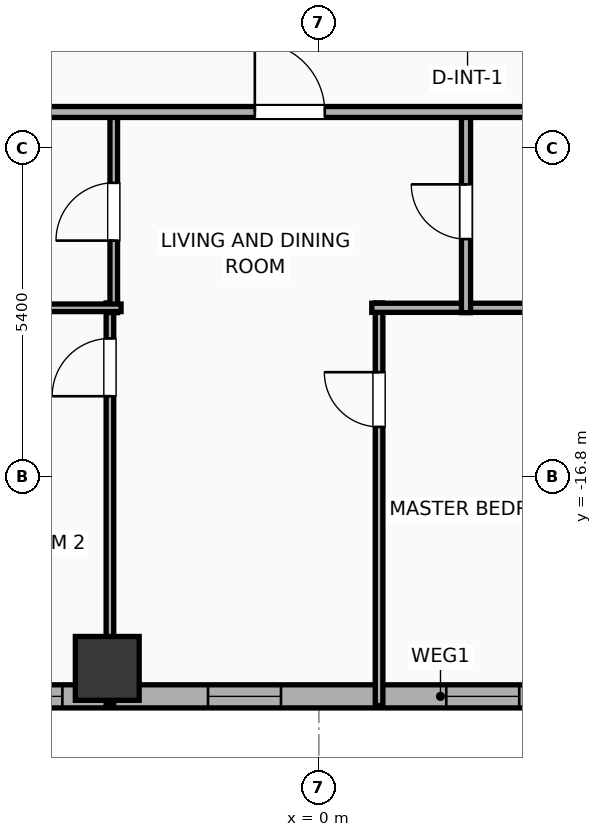
"""IFC4 building model, lengths in metres.
Left out: names, types, materials, properties, quantities, classifications, styles, units other than length and angle.
Written with IfcOpenShell. Run it as: python <this file> out.ifc"""

import sys

from ifc_helpers import new_model, si_unit, direction, frame, frame_2d, origin, origin_2d, place, context, subcontext, project, spatial, rectangle, hollow_rectangle, extrude, element, fill, save


model = new_model("IFC4")
c1 = context("Model", 3, precision=1e-05, world=origin(), true_north=direction((0.0, 1.0)))
c2 = subcontext(c1, "Body", "Model", "MODEL_VIEW")
j1 = project(units=[si_unit("LENGTHUNIT", "METRE"), si_unit("PLANEANGLEUNIT", "RADIAN")], contexts=[c1])
p1 = place(None, origin())
s1 = spatial("IfcSite", under=j1, at=p1, CompositionType="ELEMENT")
p2 = place(p1, origin())
s2 = spatial("IfcBuilding", under=s1, at=p2, CompositionType="ELEMENT")
p3 = place(p2, frame((0.0, 0.0, 109.2)))
s3 = spatial("IfcBuildingStorey", under=s2, at=p3, CompositionType="ELEMENT", Elevation=109.2)
p4 = place(p3, frame((-3.48, -19.95, 0.0), z_axis=(0.0, 0.0, 1.0), x_axis=(1.0, 0.0, 0.0)))
e1 = element("IfcColumn", 1, at=p4, inside=s3, PredefinedType="COLUMN", context=c2, shape_type="SweptSolid", body=[
    extrude(hollow_rectangle(XDim=1.05, YDim=1.05, WallThickness=0.036, at=origin_2d()), origin(), (0.0, 0.0, 1.0), 3.9),
])
p5 = place(p3, frame((29.381, -20.41, 0.0), z_axis=(0.0, 0.0, 1.0), x_axis=(-1.0, 0.0, 0.0)))
e2 = element("IfcWall", 2, at=p5, inside=s3, PredefinedType="ELEMENTEDWALL", context=c2, shape_type="SweptSolid", body=[
    extrude(rectangle(XDim=54.763, YDim=0.38, at=frame_2d((27.381, 0.0))), origin(), (0.0, 0.0, 1.0), 3.65),
])
p6 = place(p5, frame((3.995, 0.0, 0.75)))
e3 = element("IfcOpeningElement", 3, at=p6, cuts=e2, PredefinedType="OPENING", context=c2, shape_type="SweptSolid", body=[
    extrude(rectangle(XDim=2.4, YDim=2.1, at=frame_2d((1.2, 1.05))), frame((0.0, 0.2, 0.0), z_axis=(0.0, -1.0, 0.0), x_axis=(1.0, 0.0, 0.0)), (0.0, 0.0, 1.0), 0.4),
])
p7 = place(p5, frame((18.486, 0.0, 0.75)))
e4 = element("IfcOpeningElement", 4, at=p7, cuts=e2, PredefinedType="OPENING", context=c2, shape_type="SweptSolid", body=[
    extrude(rectangle(XDim=2.4, YDim=2.1, at=frame_2d((1.2, 1.05))), frame((0.0, 0.2, 0.0), z_axis=(0.0, -1.0, 0.0), x_axis=(1.0, 0.0, 0.0)), (0.0, 0.0, 1.0), 0.4),
])
p8 = place(p5, frame((46.717, 0.0, 0.75)))
e5 = element("IfcOpeningElement", 5, at=p8, cuts=e2, PredefinedType="OPENING", context=c2, shape_type="SweptSolid", body=[
    extrude(rectangle(XDim=2.4, YDim=2.1, at=frame_2d((1.2, 1.05))), frame((0.0, 0.2, 0.0), z_axis=(0.0, -1.0, 0.0), x_axis=(1.0, 0.0, 0.0)), (0.0, 0.0, 1.0), 0.4),
])
p9 = place(p5, frame((52.651, 0.0, 0.75)))
e6 = element("IfcOpeningElement", 6, at=p9, cuts=e2, PredefinedType="OPENING", context=c2, shape_type="SweptSolid", body=[
    extrude(rectangle(XDim=1.2, YDim=2.05, at=frame_2d((0.6, 1.025))), frame((0.0, 0.2, 0.0), z_axis=(0.0, -1.0, 0.0), x_axis=(1.0, 0.0, 0.0)), (0.0, 0.0, 1.0), 0.4),
])
p10 = place(p5, frame((50.521, 0.0, 0.75)))
e7 = element("IfcOpeningElement", 7, at=p10, cuts=e2, PredefinedType="OPENING", context=c2, shape_type="SweptSolid", body=[
    extrude(rectangle(XDim=1.2, YDim=2.05, at=frame_2d((0.6, 1.025))), frame((0.0, 0.2, 0.0), z_axis=(0.0, -1.0, 0.0), x_axis=(1.0, 0.0, 0.0)), (0.0, 0.0, 1.0), 0.4),
])
p11 = place(p5, frame((40.191, 0.0, 0.75)))
e8 = element("IfcOpeningElement", 8, at=p11, cuts=e2, PredefinedType="OPENING", context=c2, shape_type="SweptSolid", body=[
    extrude(rectangle(XDim=1.2, YDim=2.05, at=frame_2d((0.6, 1.025))), frame((0.0, 0.2, 0.0), z_axis=(0.0, -1.0, 0.0), x_axis=(1.0, 0.0, 0.0)), (0.0, 0.0, 1.0), 0.4),
])
p12 = place(p5, frame((44.631, 0.0, 0.75)))
e9 = element("IfcOpeningElement", 9, at=p12, cuts=e2, PredefinedType="OPENING", context=c2, shape_type="SweptSolid", body=[
    extrude(rectangle(XDim=1.2, YDim=2.05, at=frame_2d((0.6, 1.025))), frame((0.0, 0.2, 0.0), z_axis=(0.0, -1.0, 0.0), x_axis=(1.0, 0.0, 0.0)), (0.0, 0.0, 1.0), 0.4),
])
p13 = place(p5, frame((36.561, 0.0, 0.75)))
e10 = element("IfcOpeningElement", 10, at=p13, cuts=e2, PredefinedType="OPENING", context=c2, shape_type="SweptSolid", body=[
    extrude(rectangle(XDim=1.2, YDim=2.05, at=frame_2d((0.6, 1.025))), frame((0.0, 0.2, 0.0), z_axis=(0.0, -1.0, 0.0), x_axis=(1.0, 0.0, 0.0)), (0.0, 0.0, 1.0), 0.4),
])
p14 = place(p5, frame((30.004, 0.0, 0.75)))
e11 = element("IfcOpeningElement", 11, at=p14, cuts=e2, PredefinedType="OPENING", context=c2, shape_type="SweptSolid", body=[
    extrude(rectangle(XDim=1.2, YDim=2.05, at=frame_2d((0.6, 1.025))), frame((0.0, 0.2, 0.0), z_axis=(0.0, -1.0, 0.0), x_axis=(1.0, 0.0, 0.0)), (0.0, 0.0, 1.0), 0.4),
])
p15 = place(p5, frame((33.599, 0.0, 0.75)))
e12 = element("IfcOpeningElement", 12, at=p15, cuts=e2, PredefinedType="OPENING", context=c2, shape_type="SweptSolid", body=[
    extrude(rectangle(XDim=1.2, YDim=2.05, at=frame_2d((0.6, 1.025))), frame((0.0, 0.2, 0.0), z_axis=(0.0, -1.0, 0.0), x_axis=(1.0, 0.0, 0.0)), (0.0, 0.0, 1.0), 0.4),
])
p16 = place(p5, frame((26.086, 0.0, 0.75)))
e13 = element("IfcOpeningElement", 13, at=p16, cuts=e2, PredefinedType="OPENING", context=c2, shape_type="SweptSolid", body=[
    extrude(rectangle(XDim=1.2, YDim=2.05, at=frame_2d((0.6, 1.025))), frame((0.0, 0.2, 0.0), z_axis=(0.0, -1.0, 0.0), x_axis=(1.0, 0.0, 0.0)), (0.0, 0.0, 1.0), 0.4),
])
p17 = place(p5, frame((22.626, 0.0, 0.75)))
e14 = element("IfcOpeningElement", 14, at=p17, cuts=e2, PredefinedType="OPENING", context=c2, shape_type="SweptSolid", body=[
    extrude(rectangle(XDim=1.2, YDim=2.05, at=frame_2d((0.6, 1.025))), frame((0.0, 0.2, 0.0), z_axis=(0.0, -1.0, 0.0), x_axis=(1.0, 0.0, 0.0)), (0.0, 0.0, 1.0), 0.4),
])
p18 = place(p5, frame((15.361, 0.0, 0.75)))
e15 = element("IfcOpeningElement", 15, at=p18, cuts=e2, PredefinedType="OPENING", context=c2, shape_type="SweptSolid", body=[
    extrude(rectangle(XDim=1.2, YDim=2.05, at=frame_2d((0.6, 1.025))), frame((0.0, 0.2, 0.0), z_axis=(0.0, -1.0, 0.0), x_axis=(1.0, 0.0, 0.0)), (0.0, 0.0, 1.0), 0.4),
])
p19 = place(p5, frame((8.986, 0.0, 0.75)))
e16 = element("IfcOpeningElement", 16, at=p19, cuts=e2, PredefinedType="OPENING", context=c2, shape_type="SweptSolid", body=[
    extrude(rectangle(XDim=1.2, YDim=2.05, at=frame_2d((0.6, 1.025))), frame((0.0, 0.2, 0.0), z_axis=(0.0, -1.0, 0.0), x_axis=(1.0, 0.0, 0.0)), (0.0, 0.0, 1.0), 0.4),
])
p20 = place(p5, frame((1.736, 0.0, 0.75)))
e17 = element("IfcOpeningElement", 17, at=p20, cuts=e2, PredefinedType="OPENING", context=c2, shape_type="SweptSolid", body=[
    extrude(rectangle(XDim=1.2, YDim=2.05, at=frame_2d((0.6, 1.025))), frame((0.0, 0.2, 0.0), z_axis=(0.0, -1.0, 0.0), x_axis=(1.0, 0.0, 0.0)), (0.0, 0.0, 1.0), 0.4),
])
p21 = place(p3, frame((-3.436, -20.56, 0.0), z_axis=(0.0, 0.0, 1.0), x_axis=(0.0, 1.0, 0.0)))
e18 = element("IfcWall", 18, at=p21, inside=s3, PredefinedType="PARTITIONING", context=c2, shape_type="SweptSolid", body=[
    extrude(rectangle(XDim=6.62, YDim=0.125, at=frame_2d((3.31, 0.0))), origin(), (0.0, 0.0, 1.0), 3.04),
])
p22 = place(p21, frame((5.086, 0.0, 0.0)))
e19 = element("IfcOpeningElement", 19, at=p22, cuts=e18, PredefinedType="OPENING", context=c2, shape_type="SweptSolid", body=[
    extrude(rectangle(XDim=0.95, YDim=2.05, at=frame_2d((0.475, 1.025))), frame((0.0, 0.073, 0.0), z_axis=(0.0, -1.0, 0.0), x_axis=(1.0, 0.0, 0.0)), (0.0, 0.0, 1.0), 0.145),
])
p23 = place(p3, frame((0.99, -20.56, 0.0), z_axis=(0.0, 0.0, 1.0), x_axis=(0.0, 1.0, 0.0)))
e20 = element("IfcWall", 20, at=p23, inside=s3, PredefinedType="PARTITIONING", context=c2, shape_type="SweptSolid", body=[
    extrude(rectangle(XDim=6.62, YDim=0.125, at=frame_2d((3.31, 0.0))), origin(), (0.0, 0.0, 1.0), 3.65),
])
p24 = place(p23, frame((4.581, 0.0, 0.0)))
e21 = element("IfcOpeningElement", 21, at=p24, cuts=e20, PredefinedType="OPENING", context=c2, shape_type="SweptSolid", body=[
    extrude(rectangle(XDim=0.9, YDim=2.05, at=frame_2d((0.45, 1.025))), frame((0.0, 0.073, 0.0), z_axis=(0.0, -1.0, 0.0), x_axis=(1.0, 0.0, 0.0)), (0.0, 0.0, 1.0), 0.145),
])
p25 = place(p3, frame((0.87, -14.02, 0.0), z_axis=(0.0, 0.0, 1.0), x_axis=(1.0, 0.0, 0.0)))
e22 = element("IfcWall", 22, at=p25, inside=s3, PredefinedType="PLUMBINGWALL", context=c2, shape_type="SweptSolid", body=[
    extrude(rectangle(XDim=3.79, YDim=0.15, at=frame_2d((1.895, 0.0))), origin(), (0.0, 0.0, 1.0), 3.65),
])
p26 = place(p3, frame((-3.373, -14.1, 0.0), z_axis=(0.0, 0.0, 1.0), x_axis=(0.0, 1.0, 0.0)))
e23 = element("IfcWall", 23, at=p26, inside=s3, PredefinedType="PARTITIONING", context=c2, shape_type="SweptSolid", body=[
    extrude(rectangle(XDim=3.32, YDim=0.125, at=frame_2d((1.66, 0.0))), origin(), (0.0, 0.0, 1.0), 3.65),
])
p27 = place(p26, frame((1.185, 0.0, 0.0)))
e24 = element("IfcOpeningElement", 24, at=p27, cuts=e23, PredefinedType="OPENING", context=c2, shape_type="SweptSolid", body=[
    extrude(rectangle(XDim=0.95, YDim=2.05, at=frame_2d((0.475, 1.025))), frame((0.0, 0.073, 0.0), z_axis=(0.0, -1.0, 0.0), x_axis=(1.0, 0.0, 0.0)), (0.0, 0.0, 1.0), 0.145),
])
p28 = place(p3, frame((-6.46, -14.02, 0.0), z_axis=(0.0, 0.0, 1.0), x_axis=(1.0, 0.0, 0.0)))
e25 = element("IfcWall", 25, at=p28, inside=s3, PredefinedType="PARTITIONING", context=c2, shape_type="SweptSolid", body=[
    extrude(rectangle(XDim=3.207, YDim=0.125, at=frame_2d((1.604, 0.0))), origin(), (0.0, 0.0, 1.0), 3.65),
])
p29 = place(p3, frame((2.42, -14.1, 0.0), z_axis=(0.0, 0.0, 1.0), x_axis=(0.0, 1.0, 0.0)))
e26 = element("IfcWall", 26, at=p29, inside=s3, PredefinedType="PLUMBINGWALL", context=c2, shape_type="SweptSolid", body=[
    extrude(rectangle(XDim=3.32, YDim=0.15, at=frame_2d((1.66, 0.0))), origin(), (0.0, 0.0, 1.0), 3.65),
])
p30 = place(p29, frame((1.21, 0.0, 0.0)))
e27 = element("IfcOpeningElement", 27, at=p30, cuts=e26, PredefinedType="OPENING", context=c2, shape_type="SweptSolid", body=[
    extrude(rectangle(XDim=0.9, YDim=2.05, at=frame_2d((0.45, 1.025))), frame((0.0, 0.085, 0.0), z_axis=(0.0, -1.0, 0.0), x_axis=(1.0, 0.0, 0.0)), (0.0, 0.0, 1.0), 0.17),
])
p31 = place(p3, frame((-29.21, -10.8, 0.0), z_axis=(0.0, 0.0, 1.0), x_axis=(1.0, 0.0, 0.0)))
e28 = element("IfcWall", 28, at=p31, inside=s3, PredefinedType="PARTITIONING", context=c2, shape_type="SweptSolid", body=[
    extrude(rectangle(XDim=62.42, YDim=0.18, at=frame_2d((31.21, 0.0))), origin(), (0.0, 0.0, 1.0), 3.65),
])
p32 = place(p31, frame((2.74, 0.0, 0.0)))
e29 = element("IfcOpeningElement", 29, at=p32, cuts=e28, PredefinedType="OPENING", context=c2, shape_type="SweptSolid", body=[
    extrude(rectangle(XDim=0.9, YDim=2.05, at=frame_2d((0.45, 1.025))), frame((0.0, 0.1, 0.0), z_axis=(0.0, -1.0, 0.0), x_axis=(1.0, 0.0, 0.0)), (0.0, 0.0, 1.0), 0.2),
])
p33 = place(p31, frame((9.968, 0.0, 0.0)))
e30 = element("IfcOpeningElement", 30, at=p33, cuts=e28, PredefinedType="OPENING", context=c2, shape_type="SweptSolid", body=[
    extrude(rectangle(XDim=1.15, YDim=2.05, at=frame_2d((0.575, 1.025))), frame((0.0, 0.1, 0.0), z_axis=(0.0, -1.0, 0.0), x_axis=(1.0, 0.0, 0.0)), (0.0, 0.0, 1.0), 0.2),
])
p34 = place(p31, frame((17.227, 0.0, 0.0)))
e31 = element("IfcOpeningElement", 31, at=p34, cuts=e28, PredefinedType="OPENING", context=c2, shape_type="SweptSolid", body=[
    extrude(rectangle(XDim=1.15, YDim=2.05, at=frame_2d((0.575, 1.025))), frame((0.0, 0.1, 0.0), z_axis=(0.0, -1.0, 0.0), x_axis=(1.0, 0.0, 0.0)), (0.0, 0.0, 1.0), 0.2),
])
p35 = place(p31, frame((28.157, 0.0, 0.0)))
e32 = element("IfcOpeningElement", 32, at=p35, cuts=e28, PredefinedType="OPENING", context=c2, shape_type="SweptSolid", body=[
    extrude(rectangle(XDim=1.15, YDim=2.05, at=frame_2d((0.575, 1.025))), frame((0.0, 0.1, 0.0), z_axis=(0.0, -1.0, 0.0), x_axis=(1.0, 0.0, 0.0)), (0.0, 0.0, 1.0), 0.2),
])
p36 = place(p31, frame((38.512, 0.0, 0.0)))
e33 = element("IfcOpeningElement", 33, at=p36, cuts=e28, PredefinedType="OPENING", context=c2, shape_type="SweptSolid", body=[
    extrude(rectangle(XDim=1.15, YDim=2.05, at=frame_2d((0.575, 1.025))), frame((0.0, 0.1, 0.0), z_axis=(0.0, -1.0, 0.0), x_axis=(1.0, 0.0, 0.0)), (0.0, 0.0, 1.0), 0.2),
])
p37 = place(p31, frame((49.33, 0.0, 0.0)))
e34 = element("IfcOpeningElement", 34, at=p37, cuts=e28, PredefinedType="OPENING", context=c2, shape_type="SweptSolid", body=[
    extrude(rectangle(XDim=1.15, YDim=2.05, at=frame_2d((0.575, 1.025))), frame((0.0, 0.1, 0.0), z_axis=(0.0, -1.0, 0.0), x_axis=(1.0, 0.0, 0.0)), (0.0, 0.0, 1.0), 0.2),
])
p38 = place(p31, frame((58.237, 0.0, 0.0)))
e35 = element("IfcOpeningElement", 35, at=p38, cuts=e28, PredefinedType="OPENING", context=c2, shape_type="SweptSolid", body=[
    extrude(rectangle(XDim=1.15, YDim=2.05, at=frame_2d((0.575, 1.025))), frame((0.0, 0.1, 0.0), z_axis=(0.0, -1.0, 0.0), x_axis=(1.0, 0.0, 0.0)), (0.0, 0.0, 1.0), 0.2),
])
p39 = place(p14, origin())
e36 = element("IfcWindow", 36, at=p39, inside=s3, PartitioningType="SINGLE_PANEL", PredefinedType="WINDOW", context=c2, shape_type="SweptSolid", body=[
    extrude(rectangle(XDim=1.2, YDim=2.05, at=frame_2d((0.6, 1.025))), frame((0.0, 0.03, 0.0), z_axis=(0.0, -1.0, 0.0), x_axis=(1.0, 0.0, 0.0)), (0.0, 0.0, 1.0), 0.06),
])
fill(e11, e36)
p40 = place(p15, origin())
e37 = element("IfcWindow", 37, at=p40, inside=s3, PartitioningType="SINGLE_PANEL", PredefinedType="WINDOW", context=c2, shape_type="SweptSolid", body=[
    extrude(rectangle(XDim=1.2, YDim=2.05, at=frame_2d((0.6, 1.025))), frame((0.0, 0.03, 0.0), z_axis=(0.0, -1.0, 0.0), x_axis=(1.0, 0.0, 0.0)), (0.0, 0.0, 1.0), 0.06),
])
fill(e12, e37)
p41 = place(p16, origin())
e38 = element("IfcWindow", 38, at=p41, inside=s3, PartitioningType="SINGLE_PANEL", PredefinedType="WINDOW", context=c2, shape_type="SweptSolid", body=[
    extrude(rectangle(XDim=1.2, YDim=2.05, at=frame_2d((0.6, 1.025))), frame((0.0, 0.03, 0.0), z_axis=(0.0, -1.0, 0.0), x_axis=(1.0, 0.0, 0.0)), (0.0, 0.0, 1.0), 0.06),
])
fill(e13, e38)
p42 = place(p22, origin())
e39 = element("IfcDoor", 39, at=p42, inside=s3, OperationType="SINGLE_SWING_LEFT", PredefinedType="DOOR", context=c2, shape_type="SweptSolid", body=[
    extrude(rectangle(XDim=0.95, YDim=2.05, at=frame_2d((0.475, 1.025))), frame((0.0, 0.025, 0.0), z_axis=(0.0, -1.0, 0.0), x_axis=(1.0, 0.0, 0.0)), (0.0, 0.0, 1.0), 0.05),
])
fill(e19, e39)
p43 = place(p24, origin())
e40 = element("IfcDoor", 40, at=p43, inside=s3, OperationType="SINGLE_SWING_RIGHT", PredefinedType="DOOR", context=c2, shape_type="SweptSolid", body=[
    extrude(rectangle(XDim=0.9, YDim=2.05, at=frame_2d((0.45, 1.025))), frame((0.0, 0.025, 0.0), z_axis=(0.0, -1.0, 0.0), x_axis=(1.0, 0.0, 0.0)), (0.0, 0.0, 1.0), 0.05),
])
fill(e21, e40)
p44 = place(p27, origin())
e41 = element("IfcDoor", 41, at=p44, inside=s3, OperationType="SINGLE_SWING_LEFT", PredefinedType="DOOR", context=c2, shape_type="SweptSolid", body=[
    extrude(rectangle(XDim=0.95, YDim=2.05, at=frame_2d((0.475, 1.025))), frame((0.0, 0.025, 0.0), z_axis=(0.0, -1.0, 0.0), x_axis=(1.0, 0.0, 0.0)), (0.0, 0.0, 1.0), 0.05),
])
fill(e24, e41)
p45 = place(p30, origin())
e42 = element("IfcDoor", 42, at=p45, inside=s3, OperationType="SINGLE_SWING_RIGHT", PredefinedType="DOOR", context=c2, shape_type="SweptSolid", body=[
    extrude(rectangle(XDim=0.9, YDim=2.05, at=frame_2d((0.45, 1.025))), frame((0.0, 0.025, 0.0), z_axis=(0.0, -1.0, 0.0), x_axis=(1.0, 0.0, 0.0)), (0.0, 0.0, 1.0), 0.05),
])
fill(e27, e42)
p46 = place(p35, origin())
e43 = element("IfcDoor", 43, at=p46, inside=s3, OperationType="SINGLE_SWING_LEFT", PredefinedType="DOOR", context=c2, shape_type="SweptSolid", body=[
    extrude(rectangle(XDim=1.15, YDim=2.05, at=frame_2d((0.575, 1.025))), frame((0.0, 0.025, 0.0), z_axis=(0.0, -1.0, 0.0), x_axis=(1.0, 0.0, 0.0)), (0.0, 0.0, 1.0), 0.05),
])
fill(e32, e43)
save(model, sys.argv[1])
